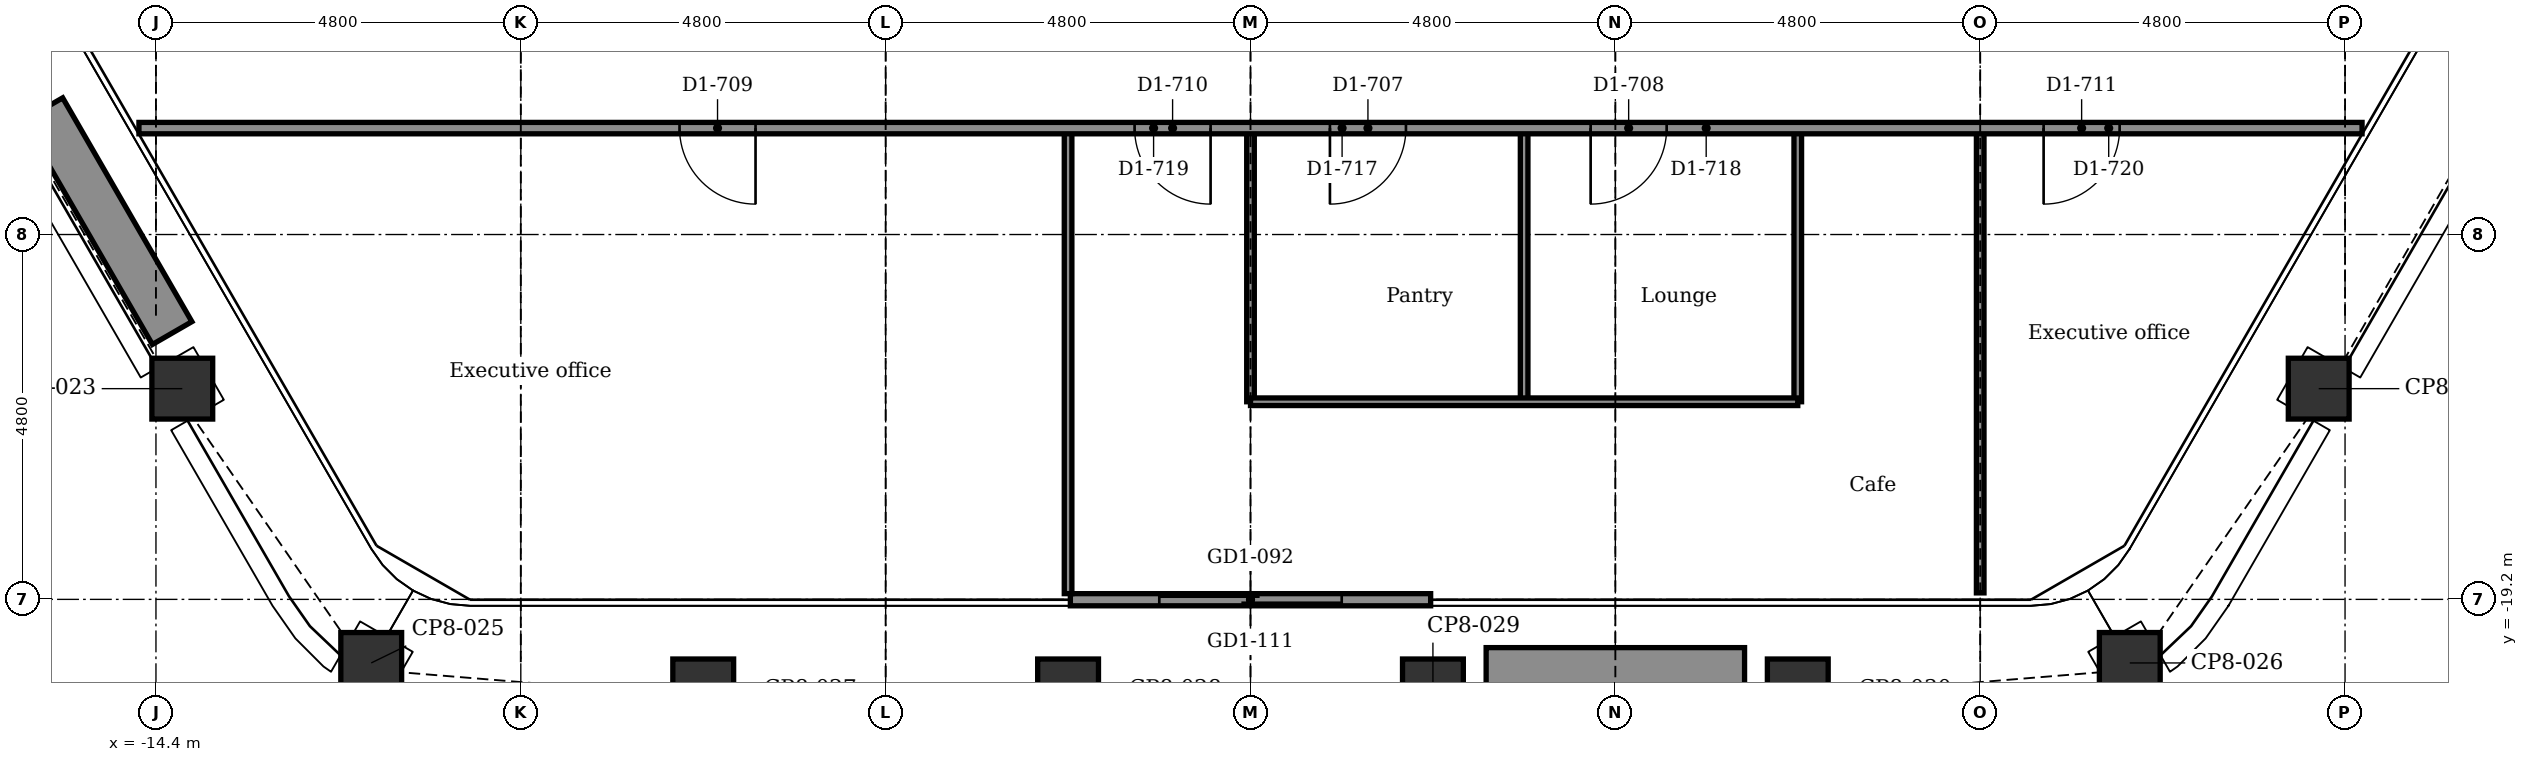
"""IFC4 building model, lengths in metres.
Left out: names, types, materials, properties, quantities, classifications, styles, units other than length and angle.
Written with IfcOpenShell. Run it as: python <this file> out.ifc"""

import sys

from ifc_helpers import new_model, si_unit, direction, frame, frame_2d, origin, origin_2d, place, context, subcontext, project, spatial, rectangle, extrude, element, fill, save


model = new_model("IFC4")
c1 = context("Model", 3, precision=1e-05, world=origin(), true_north=direction((0.0, 1.0)))
c2 = subcontext(c1, "Body", "Model", "MODEL_VIEW")
j1 = project(units=[si_unit("LENGTHUNIT", "METRE"), si_unit("PLANEANGLEUNIT", "RADIAN")], contexts=[c1])
p1 = place(None, origin())
s1 = spatial("IfcSite", under=j1, at=p1, CompositionType="ELEMENT")
p2 = place(p1, origin())
s2 = spatial("IfcBuilding", under=s1, at=p2, CompositionType="ELEMENT")
p3 = place(p2, frame((0.0, 0.0, 257.9)))
s3 = spatial("IfcBuildingStorey", under=s2, at=p3, CompositionType="ELEMENT", Elevation=257.9)
for number, where, z_axis, x_axis in (
    (1, (14.054, -16.428, -0.15), (0.0, 0.0, 1.0), (0.5, 0.866, 0.0)),
    (2, (11.568, -20.036, -0.15), (0.0, 0.0, 1.0), (0.866, 0.5, 0.0)),
    (3, (7.2, -20.385, -0.15), (0.0, 0.0, 1.0), (1.0, 0.0, 0.0)),
    (4, (2.4, -20.385, -0.15), (0.0, 0.0, 1.0), (1.0, 0.0, 0.0)),
    (5, (-2.4, -20.385, -0.15), (0.0, 0.0, 1.0), (1.0, 0.0, 0.0)),
    (6, (-7.2, -20.385, -0.15), (0.0, 0.0, 1.0), (1.0, 0.0, 0.0)),
    (7, (-11.568, -20.036, -0.15), (0.0, 0.0, 1.0), (0.5, 0.866, 0.0)),
    (8, (-14.054, -16.428, -0.15), (0.0, 0.0, 1.0), (0.866, 0.5, 0.0)),
):
    element("IfcColumn", number, at=place(p3, frame(where, z_axis=z_axis, x_axis=x_axis)), inside=s3, PredefinedType="COLUMN", context=c2, shape_type="SweptSolid", body=[
        extrude(rectangle(XDim=0.8, YDim=0.8, at=origin_2d()), origin(), (0.0, 0.0, 1.0), 3.9),
    ])
p4 = place(p3, frame((2.37, -19.205, 0.0), z_axis=(0.0, 0.0, 1.0), x_axis=(-1.0, 0.0, 0.0)))
e9 = element("IfcWall", 9, at=p4, inside=s3, PredefinedType="PARTITIONING", context=c2, shape_type="SweptSolid", body=[
    extrude(rectangle(XDim=4.74, YDim=0.16, at=frame_2d((2.37, 0.0))), origin(), (0.0, 0.0, 1.0), 3.75),
])
p5 = place(p4, frame((1.17, 0.0, 0.0)))
e10 = element("IfcOpeningElement", 10, at=p5, cuts=e9, PredefinedType="OPENING", context=c2, shape_type="SweptSolid", body=[
    extrude(rectangle(XDim=2.4, YDim=2.4, at=frame_2d((1.2, 1.2))), frame((0.0, 0.09, 0.0), z_axis=(0.0, -1.0, 0.0), x_axis=(1.0, 0.0, 0.0)), (0.0, 0.0, 1.0), 0.18),
])
p6 = place(p3, frame((6.5, -20.135, 0.0), z_axis=(0.0, 0.0, 1.0), x_axis=(-1.0, 0.0, 0.0)))
e11 = element("IfcWall", 11, at=p6, inside=s3, PredefinedType="USERDEFINED", context=c2, shape_type="SweptSolid", body=[
    extrude(rectangle(XDim=3.4, YDim=0.6, at=frame_2d((1.7, 0.0))), origin(), (0.0, 0.0, 1.0), 0.7),
])
p7 = place(p3, frame((-14.187, -15.697, 0.0), z_axis=(0.0, 0.0, 1.0), x_axis=(-0.499977295307, 0.866038511948, 0.0)))
e12 = element("IfcWall", 12, at=p7, inside=s3, PredefinedType="USERDEFINED", context=c2, shape_type="SweptSolid", body=[
    extrude(rectangle(XDim=3.4, YDim=0.6, at=frame_2d((1.7, 0.0))), origin(), (0.0, 0.0, 1.0), 0.7),
])
p8 = place(p3, frame((9.6, -19.115, 0.0), z_axis=(0.0, 0.0, 1.0), x_axis=(0.0, 1.0, 0.0)))
e13 = element("IfcWall", 13, at=p8, inside=s3, PredefinedType="PARTITIONING", context=c2, shape_type="SweptSolid", body=[
    extrude(rectangle(XDim=6.115, YDim=0.1, at=frame_2d((3.057, 0.0))), origin(), (0.0, 0.0, 1.0), 3.293),
])
for number, where, z_axis, x_axis in (
    (14, (7.2, -16.6, 0.0), (0.0, 0.0, 1.0), (0.0, 1.0, 0.0)),
    (15, (3.6, -16.6, 0.0), (0.0, 0.0, 1.0), (0.0, 1.0, 0.0)),
):
    element("IfcWall", number, at=place(p3, frame(where, z_axis=z_axis, x_axis=x_axis)), inside=s3, PredefinedType="PARTITIONING", context=c2, shape_type="SweptSolid", body=[
        extrude(rectangle(XDim=3.6, YDim=0.1, at=frame_2d((1.8, 0.0))), origin(), (0.0, 0.0, 1.0), 3.75),
    ])
p9 = place(p3, frame((0.0, -16.6, 0.0), z_axis=(0.0, 0.0, 1.0), x_axis=(0.0, 1.0, 0.0)))
e16 = element("IfcWall", 16, at=p9, inside=s3, PredefinedType="PARTITIONING", context=c2, shape_type="SweptSolid", body=[
    extrude(rectangle(XDim=3.6, YDim=0.1, at=frame_2d((1.8, 0.0))), origin(), (0.0, 0.0, 1.0), 3.217),
])
p10 = place(p3, frame((-2.4, -19.125, 0.0), z_axis=(0.0, 0.0, 1.0), x_axis=(0.0, 1.0, 0.0)))
e17 = element("IfcWall", 17, at=p10, inside=s3, PredefinedType="PARTITIONING", context=c2, shape_type="SweptSolid", body=[
    extrude(rectangle(XDim=6.125, YDim=0.1, at=frame_2d((3.062, 0.0))), origin(), (0.0, 0.0, 1.0), 3.75),
])
p11 = place(p3, frame((0.0, -16.6, 0.0), z_axis=(0.0, 0.0, 1.0), x_axis=(1.0, 0.0, 0.0)))
e18 = element("IfcWall", 18, at=p11, inside=s3, PredefinedType="PARTITIONING", context=c2, shape_type="SweptSolid", body=[
    extrude(rectangle(XDim=7.2, YDim=0.1, at=frame_2d((3.6, 0.0))), origin(), (0.0, 0.0, 1.0), 3.75),
])
p12 = place(p3, frame((-14.624, -13.0, 0.0), z_axis=(0.0, 0.0, 1.0), x_axis=(1.0, 0.0, 0.0)))
e19 = element("IfcWall", 19, at=p12, inside=s3, PredefinedType="PARTITIONING", context=c2, shape_type="SweptSolid", body=[
    extrude(rectangle(XDim=29.248, YDim=0.15, at=frame_2d((14.624, 0.0))), origin(), (0.0, 0.0, 1.0), 3.75),
])
p13 = place(p12, frame((15.669, 0.0, 0.0)))
e20 = element("IfcOpeningElement", 20, at=p13, cuts=e19, PredefinedType="OPENING", context=c2, shape_type="SweptSolid", body=[
    extrude(rectangle(XDim=1.0, YDim=2.1, at=frame_2d((0.5, 1.05))), frame((0.0, 0.085, 0.0), z_axis=(0.0, -1.0, 0.0), x_axis=(1.0, 0.0, 0.0)), (0.0, 0.0, 1.0), 0.17),
])
p14 = place(p12, frame((19.099, 0.0, 0.0)))
e21 = element("IfcOpeningElement", 21, at=p14, cuts=e19, PredefinedType="OPENING", context=c2, shape_type="SweptSolid", body=[
    extrude(rectangle(XDim=1.0, YDim=2.1, at=frame_2d((0.5, 1.05))), frame((0.0, 0.085, 0.0), z_axis=(0.0, -1.0, 0.0), x_axis=(1.0, 0.0, 0.0)), (0.0, 0.0, 1.0), 0.17),
])
p15 = place(p12, frame((7.112, 0.0, 0.0)))
e22 = element("IfcOpeningElement", 22, at=p15, cuts=e19, PredefinedType="OPENING", context=c2, shape_type="SweptSolid", body=[
    extrude(rectangle(XDim=1.0, YDim=2.1, at=frame_2d((0.5, 1.05))), frame((0.0, 0.085, 0.0), z_axis=(0.0, -1.0, 0.0), x_axis=(1.0, 0.0, 0.0)), (0.0, 0.0, 1.0), 0.17),
])
p16 = place(p12, frame((13.099, 0.0, 0.0)))
e23 = element("IfcOpeningElement", 23, at=p16, cuts=e19, PredefinedType="OPENING", context=c2, shape_type="SweptSolid", body=[
    extrude(rectangle(XDim=1.0, YDim=2.1, at=frame_2d((0.5, 1.05))), frame((0.0, 0.085, 0.0), z_axis=(0.0, -1.0, 0.0), x_axis=(1.0, 0.0, 0.0)), (0.0, 0.0, 1.0), 0.17),
])
p17 = place(p12, frame((25.058, 0.0, 0.0)))
e24 = element("IfcOpeningElement", 24, at=p17, cuts=e19, PredefinedType="OPENING", context=c2, shape_type="SweptSolid", body=[
    extrude(rectangle(XDim=1.0, YDim=2.1, at=frame_2d((0.5, 1.05))), frame((0.0, 0.085, 0.0), z_axis=(0.0, -1.0, 0.0), x_axis=(1.0, 0.0, 0.0)), (0.0, 0.0, 1.0), 0.17),
])
p18 = place(p5, origin())
e25 = element("IfcDoor", 25, at=p18, inside=s3, OperationType="DOUBLE_DOOR_SLIDING", PredefinedType="DOOR", context=c2, shape_type="SweptSolid", body=[
    extrude(rectangle(XDim=2.4, YDim=2.4, at=frame_2d((1.2, 1.2))), frame((0.0, 0.025, 0.0), z_axis=(0.0, -1.0, 0.0), x_axis=(1.0, 0.0, 0.0)), (0.0, 0.0, 1.0), 0.05),
])
fill(e10, e25)
p19 = place(p13, frame((1.0, 0.0, 0.0), z_axis=(0.0, 0.0, 1.0), x_axis=(-1.0, 0.0, 0.0)))
e26 = element("IfcDoor", 26, at=p19, inside=s3, OperationType="SINGLE_SWING_LEFT", PredefinedType="DOOR", context=c2, shape_type="SweptSolid", body=[
    extrude(rectangle(XDim=1.0, YDim=2.1, at=frame_2d((0.5, 1.05))), frame((0.0, 0.025, 0.0), z_axis=(0.0, -1.0, 0.0), x_axis=(1.0, 0.0, 0.0)), (0.0, 0.0, 1.0), 0.05),
])
fill(e20, e26)
p20 = place(p14, frame((1.0, 0.0, 0.0), z_axis=(0.0, 0.0, 1.0), x_axis=(-1.0, 0.0, 0.0)))
e27 = element("IfcDoor", 27, at=p20, inside=s3, OperationType="SINGLE_SWING_LEFT", PredefinedType="DOOR", context=c2, shape_type="SweptSolid", body=[
    extrude(rectangle(XDim=1.0, YDim=2.1, at=frame_2d((0.5, 1.05))), frame((0.0, 0.025, 0.0), z_axis=(0.0, -1.0, 0.0), x_axis=(1.0, 0.0, 0.0)), (0.0, 0.0, 1.0), 0.05),
])
fill(e21, e27)
p21 = place(p15, frame((1.0, 0.0, 0.0), z_axis=(0.0, 0.0, 1.0), x_axis=(-1.0, 0.0, 0.0)))
e28 = element("IfcDoor", 28, at=p21, inside=s3, OperationType="SINGLE_SWING_RIGHT", PredefinedType="DOOR", context=c2, shape_type="SweptSolid", body=[
    extrude(rectangle(XDim=1.0, YDim=2.1, at=frame_2d((0.5, 1.05))), frame((0.0, 0.025, 0.0), z_axis=(0.0, -1.0, 0.0), x_axis=(1.0, 0.0, 0.0)), (0.0, 0.0, 1.0), 0.05),
])
fill(e22, e28)
p22 = place(p16, frame((1.0, 0.0, 0.0), z_axis=(0.0, 0.0, 1.0), x_axis=(-1.0, 0.0, 0.0)))
e29 = element("IfcDoor", 29, at=p22, inside=s3, OperationType="SINGLE_SWING_RIGHT", PredefinedType="DOOR", context=c2, shape_type="SweptSolid", body=[
    extrude(rectangle(XDim=1.0, YDim=2.1, at=frame_2d((0.5, 1.05))), frame((0.0, 0.025, 0.0), z_axis=(0.0, -1.0, 0.0), x_axis=(1.0, 0.0, 0.0)), (0.0, 0.0, 1.0), 0.05),
])
fill(e23, e29)
p23 = place(p17, frame((1.0, 0.0, 0.0), z_axis=(0.0, 0.0, 1.0), x_axis=(-1.0, 0.0, 0.0)))
e30 = element("IfcDoor", 30, at=p23, inside=s3, OperationType="SINGLE_SWING_LEFT", PredefinedType="DOOR", context=c2, shape_type="SweptSolid", body=[
    extrude(rectangle(XDim=1.0, YDim=2.1, at=frame_2d((0.5, 1.05))), frame((0.0, 0.025, 0.0), z_axis=(0.0, -1.0, 0.0), x_axis=(1.0, 0.0, 0.0)), (0.0, 0.0, 1.0), 0.05),
])
fill(e24, e30)
save(model, sys.argv[1])
